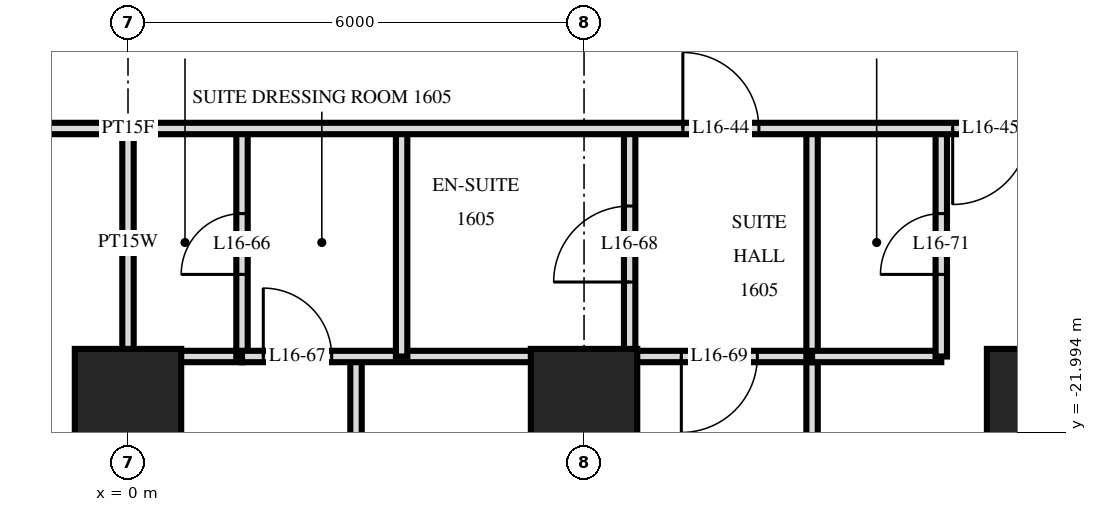
"""IFC4 building model, lengths in metres.
Left out: names, types, materials, properties, quantities, classifications, styles, units other than length and angle.
Written with IfcOpenShell. Run it as: python <this file> out.ifc"""

import sys

from ifc_helpers import new_model, si_unit, direction, frame, frame_2d, origin, origin_2d, place, context, subcontext, project, spatial, rectangle, extrude, element, fill, save


model = new_model("IFC4")
c1 = context("Model", 3, precision=1e-05, world=origin(), true_north=direction((0.0, 1.0)))
c2 = subcontext(c1, "Body", "Model", "MODEL_VIEW")
j1 = project(units=[si_unit("LENGTHUNIT", "METRE"), si_unit("PLANEANGLEUNIT", "RADIAN")], contexts=[c1])
p1 = place(None, origin())
s1 = spatial("IfcSite", under=j1, at=p1, CompositionType="ELEMENT")
p2 = place(p1, origin())
s2 = spatial("IfcBuilding", under=s1, at=p2, CompositionType="ELEMENT")
p3 = place(p2, frame((0.0, 0.0, 67.2)))
s3 = spatial("IfcBuildingStorey", under=s2, at=p3, CompositionType="ELEMENT", Elevation=67.2)
for number, where, z_axis, x_axis in (
    (1, (0.0, -21.6, 0.0), (0.0, 0.0, 1.0), (1.0, 0.0, 0.0)),
    (2, (6.0, -21.6, 0.0), (0.0, 0.0, 1.0), (1.0, 0.0, 0.0)),
    (3, (12.0, -21.6, 0.0), (0.0, 0.0, 1.0), (1.0, 0.0, 0.0)),
):
    element("IfcColumn", number, at=place(p3, frame(where, z_axis=z_axis, x_axis=x_axis)), inside=s3, PredefinedType="COLUMN", context=c2, shape_type="SweptSolid", body=[
        extrude(rectangle(XDim=1.4, YDim=1.4, at=origin_2d()), origin(), (0.0, 0.0, 1.0), 3.6),
    ])
p4 = place(p3, frame((10.7, -21.0, 0.0), z_axis=(0.0, 0.0, 1.0), x_axis=(0.0, 1.0, 0.0)))
e4 = element("IfcWall", 4, at=p4, inside=s3, PredefinedType="PARTITIONING", context=c2, shape_type="SweptSolid", body=[
    extrude(rectangle(XDim=3.0, YDim=0.15, at=frame_2d((1.5, 0.0))), origin(), (0.0, 0.0, 1.0), 3.32),
])
p5 = place(p4, frame((1.08, 0.0, 0.0)))
e5 = element("IfcOpeningElement", 5, at=p5, cuts=e4, PredefinedType="OPENING", context=c2, shape_type="SweptSolid", body=[
    extrude(rectangle(XDim=0.8, YDim=2.1, at=frame_2d((0.4, 1.05))), frame((0.0, 0.085, 0.0), z_axis=(0.0, -1.0, 0.0), x_axis=(1.0, 0.0, 0.0)), (0.0, 0.0, 1.0), 0.17),
])
p6 = place(p3, frame((9.0, -21.0, 0.0), z_axis=(0.0, 0.0, 1.0), x_axis=(0.0, 1.0, 0.0)))
e6 = element("IfcWall", 6, at=p6, inside=s3, PredefinedType="PARTITIONING", context=c2, shape_type="SweptSolid", body=[
    extrude(rectangle(XDim=3.0, YDim=0.15, at=frame_2d((1.5, 0.0))), origin(), (0.0, 0.0, 1.0), 3.32),
])
p7 = place(p3, frame((9.0, -29.22, 0.0), z_axis=(0.0, 0.0, 1.0), x_axis=(0.0, 1.0, 0.0)))
e7 = element("IfcWall", 7, at=p7, inside=s3, PredefinedType="PARTITIONING", context=c2, shape_type="SweptSolid", body=[
    extrude(rectangle(XDim=8.22, YDim=0.15, at=frame_2d((4.11, 0.0))), origin(), (0.0, 0.0, 1.0), 3.32),
])
p8 = place(p3, frame((6.6, -21.0, 0.0), z_axis=(0.0, 0.0, 1.0), x_axis=(0.0, 1.0, 0.0)))
e8 = element("IfcWall", 8, at=p8, inside=s3, PredefinedType="PARTITIONING", context=c2, shape_type="SweptSolid", body=[
    extrude(rectangle(XDim=3.0, YDim=0.15, at=frame_2d((1.5, 0.0))), origin(), (0.0, 0.0, 1.0), 3.32),
])
p9 = place(p8, frame((0.98, 0.0, 0.0)))
e9 = element("IfcOpeningElement", 9, at=p9, cuts=e8, PredefinedType="OPENING", context=c2, shape_type="SweptSolid", body=[
    extrude(rectangle(XDim=1.0, YDim=2.1, at=frame_2d((0.5, 1.05))), frame((0.0, 0.085, 0.0), z_axis=(0.0, -1.0, 0.0), x_axis=(1.0, 0.0, 0.0)), (0.0, 0.0, 1.0), 0.17),
])
p10 = place(p3, frame((3.6, -21.0, 0.0), z_axis=(0.0, 0.0, 1.0), x_axis=(0.0, 1.0, 0.0)))
e10 = element("IfcWall", 10, at=p10, inside=s3, PredefinedType="PARTITIONING", context=c2, shape_type="SweptSolid", body=[
    extrude(rectangle(XDim=3.0, YDim=0.15, at=frame_2d((1.5, 0.0))), origin(), (0.0, 0.0, 1.0), 3.32),
])
p11 = place(p3, frame((3.0, -29.22, 0.0), z_axis=(0.0, 0.0, 1.0), x_axis=(0.0, 1.0, 0.0)))
e11 = element("IfcWall", 11, at=p11, inside=s3, PredefinedType="PARTITIONING", context=c2, shape_type="SweptSolid", body=[
    extrude(rectangle(XDim=8.22, YDim=0.15, at=frame_2d((4.11, 0.0))), origin(), (0.0, 0.0, 1.0), 3.32),
])
p12 = place(p11, frame((3.57, 0.0, 0.0)))
e12 = element("IfcOpeningElement", 12, at=p12, cuts=e11, PredefinedType="OPENING", context=c2, shape_type="SweptSolid", body=[
    extrude(rectangle(XDim=0.9, YDim=2.1, at=frame_2d((0.45, 1.05))), frame((0.0, 0.085, 0.0), z_axis=(0.0, -1.0, 0.0), x_axis=(1.0, 0.0, 0.0)), (0.0, 0.0, 1.0), 0.17),
])
p13 = place(p3, frame((1.5, -21.0, 0.0), z_axis=(0.0, 0.0, 1.0), x_axis=(0.0, 1.0, 0.0)))
e13 = element("IfcWall", 13, at=p13, inside=s3, PredefinedType="PLUMBINGWALL", context=c2, shape_type="SweptSolid", body=[
    extrude(rectangle(XDim=3.0, YDim=0.15, at=frame_2d((1.5, 0.0))), origin(), (0.0, 0.0, 1.0), 3.32),
])
p14 = place(p13, frame((1.08, 0.0, 0.0)))
e14 = element("IfcOpeningElement", 14, at=p14, cuts=e13, PredefinedType="OPENING", context=c2, shape_type="SweptSolid", body=[
    extrude(rectangle(XDim=0.8, YDim=2.1, at=frame_2d((0.4, 1.05))), frame((0.0, 0.085, 0.0), z_axis=(0.0, -1.0, 0.0), x_axis=(1.0, 0.0, 0.0)), (0.0, 0.0, 1.0), 0.17),
])
p15 = place(p3, frame((0.0, -29.22, 0.0), z_axis=(0.0, 0.0, 1.0), x_axis=(0.0, 1.0, 0.0)))
e15 = element("IfcWall", 15, at=p15, inside=s3, PredefinedType="PARTITIONING", context=c2, shape_type="SweptSolid", body=[
    extrude(rectangle(XDim=8.22, YDim=0.15, at=frame_2d((4.11, 0.0))), origin(), (0.0, 0.0, 1.0), 3.32),
])
p16 = place(p3, frame((0.0, -21.0, 0.0), z_axis=(0.0, 0.0, 1.0), x_axis=(0.0, 1.0, 0.0)))
e16 = element("IfcWall", 16, at=p16, inside=s3, PredefinedType="PLUMBINGWALL", context=c2, shape_type="SweptSolid", body=[
    extrude(rectangle(XDim=3.0, YDim=0.15, at=frame_2d((1.5, 0.0))), origin(), (0.0, 0.0, 1.0), 3.32),
])
p17 = place(p3, frame((6.6, -21.0, 0.0), z_axis=(0.0, 0.0, 1.0), x_axis=(1.0, 0.0, 0.0)))
e17 = element("IfcWall", 17, at=p17, inside=s3, PredefinedType="PARTITIONING", context=c2, shape_type="SweptSolid", body=[
    extrude(rectangle(XDim=2.4, YDim=0.15, at=frame_2d((1.2, 0.0))), origin(), (0.0, 0.0, 1.0), 3.32),
])
p18 = place(p17, frame((0.68, 0.0, 0.0)))
e18 = element("IfcOpeningElement", 18, at=p18, cuts=e17, PredefinedType="OPENING", context=c2, shape_type="SweptSolid", body=[
    extrude(rectangle(XDim=1.0, YDim=2.1, at=frame_2d((0.5, 1.05))), frame((0.0, 0.085, 0.0), z_axis=(0.0, -1.0, 0.0), x_axis=(1.0, 0.0, 0.0)), (0.0, 0.0, 1.0), 0.17),
])
p19 = place(p3, frame((1.5, -21.0, 0.0), z_axis=(0.0, 0.0, 1.0), x_axis=(1.0, 0.0, 0.0)))
e19 = element("IfcWall", 19, at=p19, inside=s3, PredefinedType="PARTITIONING", context=c2, shape_type="SweptSolid", body=[
    extrude(rectangle(XDim=5.1, YDim=0.15, at=frame_2d((2.55, 0.0))), origin(), (0.0, 0.0, 1.0), 3.32),
])
p20 = place(p19, frame((0.28, 0.0, 0.0)))
e20 = element("IfcOpeningElement", 20, at=p20, cuts=e19, PredefinedType="OPENING", context=c2, shape_type="SweptSolid", body=[
    extrude(rectangle(XDim=0.9, YDim=2.1, at=frame_2d((0.45, 1.05))), frame((0.0, 0.085, 0.0), z_axis=(0.0, -1.0, 0.0), x_axis=(1.0, 0.0, 0.0)), (0.0, 0.0, 1.0), 0.17),
])
p21 = place(p3, frame((9.0, -21.0, 0.0), z_axis=(0.0, 0.0, 1.0), x_axis=(1.0, 0.0, 0.0)))
e21 = element("IfcWall", 21, at=p21, inside=s3, PredefinedType="PARTITIONING", context=c2, shape_type="SweptSolid", body=[
    extrude(rectangle(XDim=1.7, YDim=0.15, at=frame_2d((0.85, 0.0))), origin(), (0.0, 0.0, 1.0), 3.32),
])
p22 = place(p3, frame((0.0, -21.0, 0.0), z_axis=(0.0, 0.0, 1.0), x_axis=(1.0, 0.0, 0.0)))
e22 = element("IfcWall", 22, at=p22, inside=s3, PredefinedType="PLUMBINGWALL", context=c2, shape_type="SweptSolid", body=[
    extrude(rectangle(XDim=1.5, YDim=0.15, at=frame_2d((0.75, 0.0))), origin(), (0.0, 0.0, 1.0), 3.32),
])
p23 = place(p3, frame((-33.12, -18.0, 0.0), z_axis=(0.0, 0.0, 1.0), x_axis=(1.0, 0.0, 0.0)))
e23 = element("IfcWall", 23, at=p23, inside=s3, PredefinedType="PARTITIONING", context=c2, shape_type="SweptSolid", body=[
    extrude(rectangle(XDim=66.24, YDim=0.15, at=frame_2d((33.12, 0.0))), origin(), (0.0, 0.0, 1.0), 3.32),
])
p24 = place(p23, frame((15.27, 0.0, 0.0)))
e24 = element("IfcOpeningElement", 24, at=p24, cuts=e23, PredefinedType="OPENING", context=c2, shape_type="SweptSolid", body=[
    extrude(rectangle(XDim=1.0, YDim=2.1, at=frame_2d((0.5, 1.05))), frame((0.0, 0.085, 0.0), z_axis=(0.0, -1.0, 0.0), x_axis=(1.0, 0.0, 0.0)), (0.0, 0.0, 1.0), 0.17),
])
p25 = place(p23, frame((21.22, 0.0, 0.0)))
e25 = element("IfcOpeningElement", 25, at=p25, cuts=e23, PredefinedType="OPENING", context=c2, shape_type="SweptSolid", body=[
    extrude(rectangle(XDim=1.0, YDim=2.1, at=frame_2d((0.5, 1.05))), frame((0.0, 0.085, 0.0), z_axis=(0.0, -1.0, 0.0), x_axis=(1.0, 0.0, 0.0)), (0.0, 0.0, 1.0), 0.17),
])
p26 = place(p23, frame((24.27, 0.0, 0.0)))
e26 = element("IfcOpeningElement", 26, at=p26, cuts=e23, PredefinedType="OPENING", context=c2, shape_type="SweptSolid", body=[
    extrude(rectangle(XDim=1.0, YDim=2.1, at=frame_2d((0.5, 1.05))), frame((0.0, 0.085, 0.0), z_axis=(0.0, -1.0, 0.0), x_axis=(1.0, 0.0, 0.0)), (0.0, 0.0, 1.0), 0.17),
])
p27 = place(p23, frame((30.97, 0.0, 0.0)))
e27 = element("IfcOpeningElement", 27, at=p27, cuts=e23, PredefinedType="OPENING", context=c2, shape_type="SweptSolid", body=[
    extrude(rectangle(XDim=1.0, YDim=2.1, at=frame_2d((0.5, 1.05))), frame((0.0, 0.085, 0.0), z_axis=(0.0, -1.0, 0.0), x_axis=(1.0, 0.0, 0.0)), (0.0, 0.0, 1.0), 0.17),
])
p28 = place(p23, frame((40.42, 0.0, 0.0)))
e28 = element("IfcOpeningElement", 28, at=p28, cuts=e23, PredefinedType="OPENING", context=c2, shape_type="SweptSolid", body=[
    extrude(rectangle(XDim=1.0, YDim=2.1, at=frame_2d((0.5, 1.05))), frame((0.0, 0.085, 0.0), z_axis=(0.0, -1.0, 0.0), x_axis=(1.0, 0.0, 0.0)), (0.0, 0.0, 1.0), 0.17),
])
p29 = place(p23, frame((43.97, 0.0, 0.0)))
e29 = element("IfcOpeningElement", 29, at=p29, cuts=e23, PredefinedType="OPENING", context=c2, shape_type="SweptSolid", body=[
    extrude(rectangle(XDim=1.0, YDim=2.1, at=frame_2d((0.5, 1.05))), frame((0.0, 0.085, 0.0), z_axis=(0.0, -1.0, 0.0), x_axis=(1.0, 0.0, 0.0)), (0.0, 0.0, 1.0), 0.17),
])
p30 = place(p23, frame((45.52, 0.0, 0.0)))
e30 = element("IfcOpeningElement", 30, at=p30, cuts=e23, PredefinedType="OPENING", context=c2, shape_type="SweptSolid", body=[
    extrude(rectangle(XDim=1.0, YDim=2.1, at=frame_2d((0.5, 1.05))), frame((0.0, 0.085, 0.0), z_axis=(0.0, -1.0, 0.0), x_axis=(1.0, 0.0, 0.0)), (0.0, 0.0, 1.0), 0.17),
])
p31 = place(p23, frame((52.97, 0.0, 0.0)))
e31 = element("IfcOpeningElement", 31, at=p31, cuts=e23, PredefinedType="OPENING", context=c2, shape_type="SweptSolid", body=[
    extrude(rectangle(XDim=1.0, YDim=2.1, at=frame_2d((0.5, 1.05))), frame((0.0, 0.085, 0.0), z_axis=(0.0, -1.0, 0.0), x_axis=(1.0, 0.0, 0.0)), (0.0, 0.0, 1.0), 0.17),
])
p32 = place(p23, frame((54.27, 0.0, 0.0)))
e32 = element("IfcOpeningElement", 32, at=p32, cuts=e23, PredefinedType="OPENING", context=c2, shape_type="SweptSolid", body=[
    extrude(rectangle(XDim=1.0, YDim=2.1, at=frame_2d((0.5, 1.05))), frame((0.0, 0.085, 0.0), z_axis=(0.0, -1.0, 0.0), x_axis=(1.0, 0.0, 0.0)), (0.0, 0.0, 1.0), 0.17),
])
p33 = place(p23, frame((13.42, 0.0, 0.0)))
e33 = element("IfcOpeningElement", 33, at=p33, cuts=e23, PredefinedType="OPENING", context=c2, shape_type="SweptSolid", body=[
    extrude(rectangle(XDim=1.0, YDim=2.1, at=frame_2d((0.5, 1.05))), frame((0.0, 0.085, 0.0), z_axis=(0.0, -1.0, 0.0), x_axis=(1.0, 0.0, 0.0)), (0.0, 0.0, 1.0), 0.17),
])
p34 = place(p23, frame((60.82, 0.0, 0.0)))
e34 = element("IfcOpeningElement", 34, at=p34, cuts=e23, PredefinedType="OPENING", context=c2, shape_type="SweptSolid", body=[
    extrude(rectangle(XDim=1.0, YDim=2.1, at=frame_2d((0.5, 1.05))), frame((0.0, 0.085, 0.0), z_axis=(0.0, -1.0, 0.0), x_axis=(1.0, 0.0, 0.0)), (0.0, 0.0, 1.0), 0.17),
])
p35 = place(p28, origin())
e35 = element("IfcDoor", 35, at=p35, inside=s3, OperationType="SINGLE_SWING_RIGHT", PredefinedType="DOOR", context=c2, shape_type="SweptSolid", body=[
    extrude(rectangle(XDim=1.0, YDim=2.1, at=frame_2d((0.5, 1.05))), frame((0.0, 0.025, 0.0), z_axis=(0.0, -1.0, 0.0), x_axis=(1.0, 0.0, 0.0)), (0.0, 0.0, 1.0), 0.05),
])
fill(e28, e35)
p36 = place(p29, frame((0.5, 0.0, 0.0), z_axis=(0.0, 0.0, 1.0), x_axis=(-1.0, 0.0, 0.0)))
e36 = element("IfcDoor", 36, at=p36, inside=s3, OperationType="SINGLE_SWING_LEFT", PredefinedType="DOOR", context=c2, shape_type="SweptSolid", body=[
    extrude(rectangle(XDim=1.0, YDim=2.1, at=frame_2d((0.0, 1.05))), frame((0.0, -0.025, 0.0), z_axis=(0.0, 1.0, 0.0), x_axis=(-1.0, 0.0, 0.0)), (0.0, 0.0, 1.0), 0.05),
])
fill(e29, e36)
p37 = place(p14, origin())
e37 = element("IfcDoor", 37, at=p37, inside=s3, OperationType="SINGLE_SWING_RIGHT", PredefinedType="DOOR", context=c2, shape_type="SweptSolid", body=[
    extrude(rectangle(XDim=0.8, YDim=2.1, at=frame_2d((0.4, 1.05))), frame((0.0, 0.025, 0.0), z_axis=(0.0, -1.0, 0.0), x_axis=(1.0, 0.0, 0.0)), (0.0, 0.0, 1.0), 0.05),
])
fill(e14, e37)
p38 = place(p20, origin())
e38 = element("IfcDoor", 38, at=p38, inside=s3, OperationType="SINGLE_SWING_RIGHT", PredefinedType="DOOR", context=c2, shape_type="SweptSolid", body=[
    extrude(rectangle(XDim=0.9, YDim=2.1, at=frame_2d((0.45, 1.05))), frame((0.0, 0.025, 0.0), z_axis=(0.0, -1.0, 0.0), x_axis=(1.0, 0.0, 0.0)), (0.0, 0.0, 1.0), 0.05),
])
fill(e20, e38)
p39 = place(p9, origin())
e39 = element("IfcDoor", 39, at=p39, inside=s3, OperationType="SINGLE_SWING_RIGHT", PredefinedType="DOOR", context=c2, shape_type="SweptSolid", body=[
    extrude(rectangle(XDim=1.0, YDim=2.1, at=frame_2d((0.5, 1.05))), frame((0.0, 0.025, 0.0), z_axis=(0.0, -1.0, 0.0), x_axis=(1.0, 0.0, 0.0)), (0.0, 0.0, 1.0), 0.05),
])
fill(e9, e39)
p40 = place(p18, frame((0.5, 0.0, 0.0), z_axis=(0.0, 0.0, 1.0), x_axis=(-1.0, 0.0, 0.0)))
e40 = element("IfcDoor", 40, at=p40, inside=s3, OperationType="SINGLE_SWING_LEFT", PredefinedType="DOOR", context=c2, shape_type="SweptSolid", body=[
    extrude(rectangle(XDim=1.0, YDim=2.1, at=frame_2d((0.0, 1.05))), frame((0.0, -0.025, 0.0), z_axis=(0.0, 1.0, 0.0), x_axis=(-1.0, 0.0, 0.0)), (0.0, 0.0, 1.0), 0.05),
])
fill(e18, e40)
p41 = place(p5, origin())
e41 = element("IfcDoor", 41, at=p41, inside=s3, OperationType="SINGLE_SWING_RIGHT", PredefinedType="DOOR", context=c2, shape_type="SweptSolid", body=[
    extrude(rectangle(XDim=0.8, YDim=2.1, at=frame_2d((0.4, 1.05))), frame((0.0, 0.025, 0.0), z_axis=(0.0, -1.0, 0.0), x_axis=(1.0, 0.0, 0.0)), (0.0, 0.0, 1.0), 0.05),
])
fill(e5, e41)
save(model, sys.argv[1])
